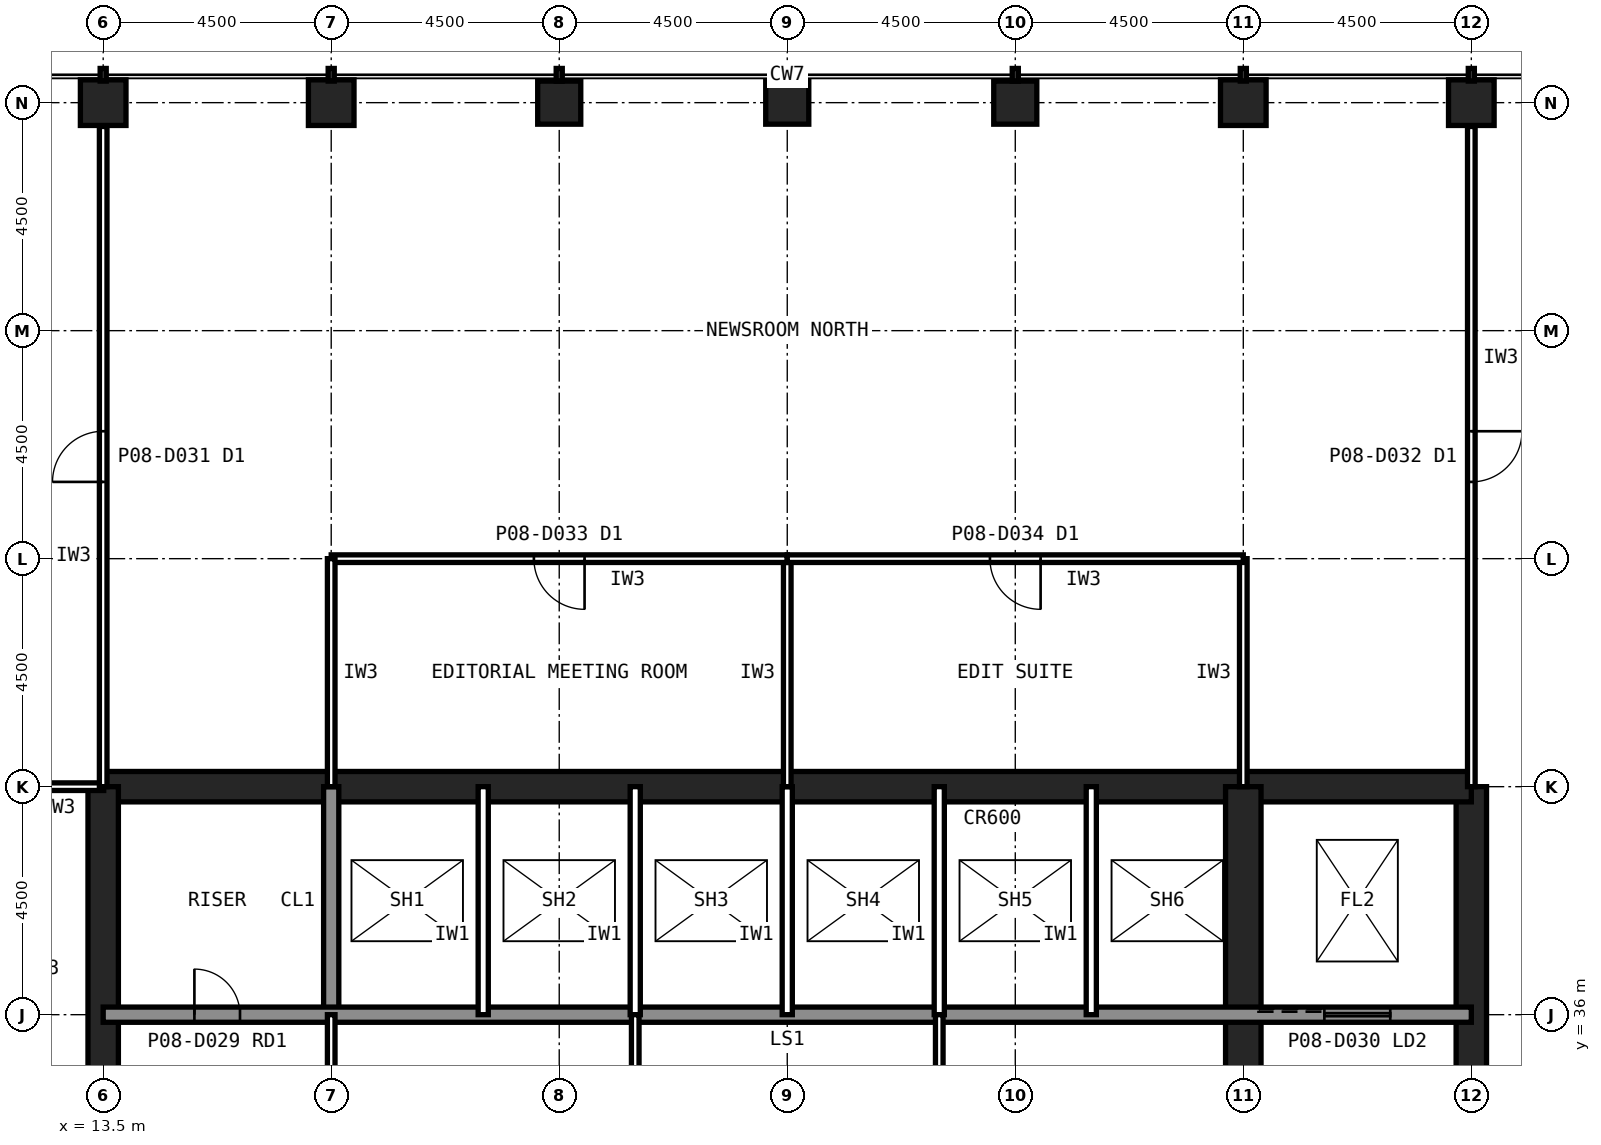
"""IFC4 building model, lengths in metres.
Left out: names, types, materials, properties, quantities, classifications, styles, units other than length and angle.
Written with IfcOpenShell. Run it as: python <this file> out.ifc"""

import sys

from ifc_helpers import new_model, si_unit, direction, frame, frame_2d, origin, origin_2d, place, context, subcontext, project, spatial, rectangle, hollow_rectangle, extrude, element, fill, save


model = new_model("IFC4")
c1 = context("Model", 3, precision=1e-05, world=origin(), true_north=direction((0.0, 1.0)))
c2 = subcontext(c1, "Body", "Model", "MODEL_VIEW")
j1 = project(units=[si_unit("LENGTHUNIT", "METRE"), si_unit("PLANEANGLEUNIT", "RADIAN")], contexts=[c1])
p1 = place(None, origin())
s1 = spatial("IfcSite", under=j1, at=p1, CompositionType="ELEMENT")
p2 = place(p1, origin())
s2 = spatial("IfcBuilding", under=s1, at=p2, CompositionType="ELEMENT")
p3 = place(p2, frame((0.0, 0.0, 37.4)))
s3 = spatial("IfcBuildingStorey", under=s2, at=p3, CompositionType="ELEMENT", Elevation=37.4)
for number, where, z_axis, x_axis in (
    (1, (40.5, 54.0, 0.0), (0.0, 0.0, 1.0), (1.0, 0.0, 0.0)),
    (2, (36.0, 54.0, 0.0), (0.0, 0.0, 1.0), (1.0, 0.0, 0.0)),
):
    element("IfcColumn", number, at=place(p3, frame(where, z_axis=z_axis, x_axis=x_axis)), inside=s3, PredefinedType="COLUMN", context=c2, shape_type="SweptSolid", body=[
        extrude(hollow_rectangle(XDim=0.9, YDim=0.9, WallThickness=0.063, at=origin_2d()), origin(), (0.0, 0.0, 1.0), 4.2),
    ])
for number, where, z_axis, x_axis in (
    (3, (31.5, 54.0, 0.0), (0.0, 0.0, 1.0), (1.0, 0.0, 0.0)),
    (4, (27.0, 54.0, 0.0), (0.0, 0.0, 1.0), (1.0, 0.0, 0.0)),
    (5, (22.5, 54.0, 0.0), (0.0, 0.0, 1.0), (1.0, 0.0, 0.0)),
):
    element("IfcColumn", number, at=place(p3, frame(where, z_axis=z_axis, x_axis=x_axis)), inside=s3, PredefinedType="COLUMN", context=c2, shape_type="SweptSolid", body=[
        extrude(hollow_rectangle(XDim=0.85, YDim=0.85, WallThickness=0.05, at=origin_2d()), origin(), (0.0, 0.0, 1.0), 4.2),
    ])
for number, where, z_axis, x_axis in (
    (6, (18.0, 54.0, 0.0), (0.0, 0.0, 1.0), (1.0, 0.0, 0.0)),
    (7, (13.5, 54.0, 0.0), (0.0, 0.0, 1.0), (1.0, 0.0, 0.0)),
):
    element("IfcColumn", number, at=place(p3, frame(where, z_axis=z_axis, x_axis=x_axis)), inside=s3, PredefinedType="COLUMN", context=c2, shape_type="SweptSolid", body=[
        extrude(hollow_rectangle(XDim=0.9, YDim=0.9, WallThickness=0.063, at=origin_2d()), origin(), (0.0, 0.0, 1.0), 4.2),
    ])
p4 = place(p3, frame((40.5, 13.5, 0.0), z_axis=(0.0, 0.0, 1.0), x_axis=(0.0, 1.0, 0.0)))
e8 = element("IfcWall", 8, at=p4, inside=s3, PredefinedType="SHEAR", context=c2, shape_type="SweptSolid", body=[
    extrude(rectangle(XDim=27.0, YDim=0.6, at=frame_2d((13.5, 0.0))), origin(), (0.0, 0.0, 1.0), 4.2),
])
p5 = place(p4, frame((5.85, 0.0, 0.0)))
e9 = element("IfcOpeningElement", 9, at=p5, cuts=e8, PredefinedType="OPENING", context=c2, shape_type="SweptSolid", body=[
    extrude(rectangle(XDim=1.8, YDim=2.1, at=frame_2d((0.9, 1.05))), frame((0.0, 0.31, 0.0), z_axis=(0.0, -1.0, 0.0), x_axis=(1.0, 0.0, 0.0)), (0.0, 0.0, 1.0), 0.62),
])
p6 = place(p4, frame((19.65, 0.0, 0.0)))
e10 = element("IfcOpeningElement", 10, at=p6, cuts=e8, PredefinedType="OPENING", context=c2, shape_type="SweptSolid", body=[
    extrude(rectangle(XDim=1.2, YDim=2.1, at=frame_2d((0.6, 1.05))), frame((0.0, 0.31, 0.0), z_axis=(0.0, -1.0, 0.0), x_axis=(1.0, 0.0, 0.0)), (0.0, 0.0, 1.0), 0.62),
])
p7 = place(p3, frame((40.5, 40.5, 0.0), z_axis=(0.0, 0.0, 1.0), x_axis=(-1.0, 0.0, 0.0)))
e11 = element("IfcWall", 11, at=p7, inside=s3, PredefinedType="SHEAR", context=c2, shape_type="SweptSolid", body=[
    extrude(rectangle(XDim=27.0, YDim=0.6, at=frame_2d((13.5, 0.0))), origin(), (0.0, 0.0, 1.0), 4.2),
])
p8 = place(p3, frame((13.5, 40.5, 0.0), z_axis=(0.0, 0.0, 1.0), x_axis=(0.0, -1.0, 0.0)))
e12 = element("IfcWall", 12, at=p8, inside=s3, PredefinedType="SHEAR", context=c2, shape_type="SweptSolid", body=[
    extrude(rectangle(XDim=27.0, YDim=0.6, at=frame_2d((13.5, 0.0))), origin(), (0.0, 0.0, 1.0), 4.2),
])
p9 = place(p8, frame((19.65, 0.0, 0.0)))
e13 = element("IfcOpeningElement", 13, at=p9, cuts=e12, PredefinedType="OPENING", context=c2, shape_type="SweptSolid", body=[
    extrude(rectangle(XDim=1.2, YDim=2.1, at=frame_2d((0.6, 1.05))), frame((0.0, 0.31, 0.0), z_axis=(0.0, -1.0, 0.0), x_axis=(1.0, 0.0, 0.0)), (0.0, 0.0, 1.0), 0.62),
])
p10 = place(p8, frame((5.85, 0.0, 0.0)))
e14 = element("IfcOpeningElement", 14, at=p10, cuts=e12, PredefinedType="OPENING", context=c2, shape_type="SweptSolid", body=[
    extrude(rectangle(XDim=1.8, YDim=2.1, at=frame_2d((0.9, 1.05))), frame((0.0, 0.31, 0.0), z_axis=(0.0, -1.0, 0.0), x_axis=(1.0, 0.0, 0.0)), (0.0, 0.0, 1.0), 0.62),
])
p11 = place(p3, frame((18.0, 36.0, 0.0), z_axis=(0.0, 0.0, 1.0), x_axis=(0.0, 1.0, 0.0)))
e15 = element("IfcWall", 15, at=p11, inside=s3, PredefinedType="SOLIDWALL", context=c2, shape_type="SweptSolid", body=[
    extrude(rectangle(XDim=4.5, YDim=0.3, at=frame_2d((2.25, 0.0))), origin(), (0.0, 0.0, 1.0), 4.04),
])
p12 = place(p3, frame((36.0, 22.5, 0.0), z_axis=(0.0, 0.0, 1.0), x_axis=(0.0, 1.0, 0.0)))
e16 = element("IfcWall", 16, at=p12, inside=s3, PredefinedType="SHEAR", context=c2, shape_type="SweptSolid", body=[
    extrude(rectangle(XDim=18.0, YDim=0.7, at=frame_2d((9.0, 0.0))), origin(), (0.0, 0.0, 1.0), 4.2),
])
p13 = place(p3, frame((13.5, 36.0, 0.0), z_axis=(0.0, 0.0, 1.0), x_axis=(1.0, 0.0, 0.0)))
e17 = element("IfcWall", 17, at=p13, inside=s3, PredefinedType="SOLIDWALL", context=c2, shape_type="SweptSolid", body=[
    extrude(rectangle(XDim=27.0, YDim=0.3, at=frame_2d((13.5, 0.0))), origin(), (0.0, 0.0, 1.0), 4.04),
])
p14 = place(p13, frame((1.8, 0.0, 0.0)))
e18 = element("IfcOpeningElement", 18, at=p14, cuts=e17, PredefinedType="OPENING", context=c2, shape_type="SweptSolid", body=[
    extrude(rectangle(XDim=0.9, YDim=2.1, at=frame_2d((0.45, 1.05))), frame((0.0, 0.16, 0.0), z_axis=(0.0, -1.0, 0.0), x_axis=(1.0, 0.0, 0.0)), (0.0, 0.0, 1.0), 0.32),
])
p15 = place(p13, frame((24.1, 0.0, 0.0)))
e19 = element("IfcOpeningElement", 19, at=p15, cuts=e17, PredefinedType="OPENING", context=c2, shape_type="SweptSolid", body=[
    extrude(rectangle(XDim=1.3, YDim=2.2, at=frame_2d((0.65, 1.1))), frame((0.0, 0.16, 0.0), z_axis=(0.0, -1.0, 0.0), x_axis=(1.0, 0.0, 0.0)), (0.0, 0.0, 1.0), 0.32),
])
for number, where, z_axis, x_axis in (
    (20, (21.0, 36.0, 0.0), (0.0, 0.0, 1.0), (0.0, 1.0, 0.0)),
    (21, (24.0, 36.0, 0.0), (0.0, 0.0, 1.0), (0.0, 1.0, 0.0)),
    (22, (27.0, 36.0, 0.0), (0.0, 0.0, 1.0), (0.0, 1.0, 0.0)),
    (23, (30.0, 36.0, 0.0), (0.0, 0.0, 1.0), (0.0, 1.0, 0.0)),
    (24, (33.0, 36.0, 0.0), (0.0, 0.0, 1.0), (0.0, 1.0, 0.0)),
):
    element("IfcWall", number, at=place(p3, frame(where, z_axis=z_axis, x_axis=x_axis)), inside=s3, PredefinedType="PARTITIONING", context=c2, shape_type="SweptSolid", body=[
        extrude(rectangle(XDim=4.5, YDim=0.2, at=frame_2d((2.25, 0.0))), origin(), (0.0, 0.0, 1.0), 4.04),
    ])
for number, where, z_axis, x_axis in (
    (25, (18.0, 33.3, 0.0), (0.0, 0.0, 1.0), (0.0, 1.0, 0.0)),
    (26, (24.0, 33.3, 0.0), (0.0, 0.0, 1.0), (0.0, 1.0, 0.0)),
    (27, (30.0, 33.3, 0.0), (0.0, 0.0, 1.0), (0.0, 1.0, 0.0)),
):
    element("IfcWall", number, at=place(p3, frame(where, z_axis=z_axis, x_axis=x_axis)), inside=s3, PredefinedType="PARTITIONING", context=c2, shape_type="SweptSolid", body=[
        extrude(rectangle(XDim=2.7, YDim=0.15, at=frame_2d((1.35, 0.0))), origin(), (0.0, 0.0, 1.0), 4.04),
    ])
p16 = place(p3, frame((13.51, 40.5, 0.0), z_axis=(0.0, 0.0, 1.0), x_axis=(-1.0, 0.0, 0.0)))
e28 = element("IfcWall", 28, at=p16, inside=s3, PredefinedType="PARTITIONING", context=c2, shape_type="SweptSolid", body=[
    extrude(rectangle(XDim=1.81, YDim=0.15, at=frame_2d((0.905, 0.0))), origin(), (0.0, 0.0, 1.0), 3.189),
])
p17 = place(p3, frame((27.0, 40.5, 0.0), z_axis=(0.0, 0.0, 1.0), x_axis=(0.0, 1.0, 0.0)))
e29 = element("IfcWall", 29, at=p17, inside=s3, PredefinedType="PARTITIONING", context=c2, shape_type="SweptSolid", body=[
    extrude(rectangle(XDim=4.5, YDim=0.15, at=frame_2d((2.25, 0.0))), origin(), (0.0, 0.0, 1.0), 3.189),
])
p18 = place(p3, frame((27.0, 45.0, 0.0), z_axis=(0.0, 0.0, 1.0), x_axis=(-1.0, 0.0, 0.0)))
e30 = element("IfcWall", 30, at=p18, inside=s3, PredefinedType="PARTITIONING", context=c2, shape_type="SweptSolid", body=[
    extrude(rectangle(XDim=9.0, YDim=0.15, at=frame_2d((4.5, 0.0))), origin(), (0.0, 0.0, 1.0), 4.04),
])
p19 = place(p18, frame((4.0, 0.0, 0.0)))
e31 = element("IfcOpeningElement", 31, at=p19, cuts=e30, PredefinedType="OPENING", context=c2, shape_type="SweptSolid", body=[
    extrude(rectangle(XDim=1.0, YDim=2.1, at=frame_2d((0.5, 1.05))), frame((0.0, 0.085, 0.0), z_axis=(0.0, -1.0, 0.0), x_axis=(1.0, 0.0, 0.0)), (0.0, 0.0, 1.0), 0.17),
])
for number, where, z_axis, x_axis in (
    (32, (18.0, 45.0, 0.0), (0.0, 0.0, 1.0), (0.0, -1.0, 0.0)),
    (33, (36.0, 40.5, 0.0), (0.0, 0.0, 1.0), (0.0, 1.0, 0.0)),
):
    element("IfcWall", number, at=place(p3, frame(where, z_axis=z_axis, x_axis=x_axis)), inside=s3, PredefinedType="PARTITIONING", context=c2, shape_type="SweptSolid", body=[
        extrude(rectangle(XDim=4.5, YDim=0.15, at=frame_2d((2.25, 0.0))), origin(), (0.0, 0.0, 1.0), 3.189),
    ])
p20 = place(p3, frame((36.0, 45.0, 0.0), z_axis=(0.0, 0.0, 1.0), x_axis=(-1.0, 0.0, 0.0)))
e34 = element("IfcWall", 34, at=p20, inside=s3, PredefinedType="PARTITIONING", context=c2, shape_type="SweptSolid", body=[
    extrude(rectangle(XDim=9.0, YDim=0.15, at=frame_2d((4.5, 0.0))), origin(), (0.0, 0.0, 1.0), 4.04),
])
p21 = place(p20, frame((4.0, 0.0, 0.0)))
e35 = element("IfcOpeningElement", 35, at=p21, cuts=e34, PredefinedType="OPENING", context=c2, shape_type="SweptSolid", body=[
    extrude(rectangle(XDim=1.0, YDim=2.1, at=frame_2d((0.5, 1.05))), frame((0.0, 0.085, 0.0), z_axis=(0.0, -1.0, 0.0), x_axis=(1.0, 0.0, 0.0)), (0.0, 0.0, 1.0), 0.17),
])
p22 = place(p3, frame((40.5, 53.53, 0.0), z_axis=(0.0, 0.0, 1.0), x_axis=(0.0, -1.0, 0.0)))
e36 = element("IfcWall", 36, at=p22, inside=s3, PredefinedType="PARTITIONING", context=c2, shape_type="SweptSolid", body=[
    extrude(rectangle(XDim=13.03, YDim=0.15, at=frame_2d((6.515, 0.0))), origin(), (0.0, 0.0, 1.0), 3.189),
])
p23 = place(p22, frame((6.015, 0.0, 0.0)))
e37 = element("IfcOpeningElement", 37, at=p23, cuts=e36, PredefinedType="OPENING", context=c2, shape_type="SweptSolid", body=[
    extrude(rectangle(XDim=1.0, YDim=2.1, at=frame_2d((0.5, 1.05))), frame((0.0, 0.085, 0.0), z_axis=(0.0, -1.0, 0.0), x_axis=(1.0, 0.0, 0.0)), (0.0, 0.0, 1.0), 0.17),
])
p24 = place(p3, frame((13.5, 40.5, 0.0), z_axis=(0.0, 0.0, 1.0), x_axis=(0.0, 1.0, 0.0)))
e38 = element("IfcWall", 38, at=p24, inside=s3, PredefinedType="PARTITIONING", context=c2, shape_type="SweptSolid", body=[
    extrude(rectangle(XDim=13.03, YDim=0.15, at=frame_2d((6.515, 0.0))), origin(), (0.0, 0.0, 1.0), 3.189),
])
p25 = place(p24, frame((6.015, 0.0, 0.0)))
e39 = element("IfcOpeningElement", 39, at=p25, cuts=e38, PredefinedType="OPENING", context=c2, shape_type="SweptSolid", body=[
    extrude(rectangle(XDim=1.0, YDim=2.1, at=frame_2d((0.5, 1.05))), frame((0.0, 0.085, 0.0), z_axis=(0.0, -1.0, 0.0), x_axis=(1.0, 0.0, 0.0)), (0.0, 0.0, 1.0), 0.17),
])
p26 = place(p14, origin())
e40 = element("IfcDoor", 40, at=p26, inside=s3, OperationType="SINGLE_SWING_LEFT", PredefinedType="DOOR", context=c2, shape_type="SweptSolid", body=[
    extrude(rectangle(XDim=0.9, YDim=2.1, at=frame_2d((0.45, 1.05))), frame((0.0, 0.025, 0.0), z_axis=(0.0, -1.0, 0.0), x_axis=(1.0, 0.0, 0.0)), (0.0, 0.0, 1.0), 0.05),
])
fill(e18, e40)
p27 = place(p15, origin())
e41 = element("IfcDoor", 41, at=p27, inside=s3, OperationType="SLIDING_TO_LEFT", PredefinedType="DOOR", context=c2, shape_type="SweptSolid", body=[
    extrude(rectangle(XDim=1.3, YDim=2.2, at=frame_2d((0.65, 1.1))), frame((0.0, 0.025, 0.0), z_axis=(0.0, -1.0, 0.0), x_axis=(1.0, 0.0, 0.0)), (0.0, 0.0, 1.0), 0.05),
])
fill(e19, e41)
p28 = place(p19, origin())
e42 = element("IfcDoor", 42, at=p28, inside=s3, OperationType="SINGLE_SWING_LEFT", PredefinedType="DOOR", context=c2, shape_type="SweptSolid", body=[
    extrude(rectangle(XDim=1.0, YDim=2.1, at=frame_2d((0.5, 1.05))), frame((0.0, 0.025, 0.0), z_axis=(0.0, -1.0, 0.0), x_axis=(1.0, 0.0, 0.0)), (0.0, 0.0, 1.0), 0.05),
])
fill(e31, e42)
p29 = place(p21, origin())
e43 = element("IfcDoor", 43, at=p29, inside=s3, OperationType="SINGLE_SWING_LEFT", PredefinedType="DOOR", context=c2, shape_type="SweptSolid", body=[
    extrude(rectangle(XDim=1.0, YDim=2.1, at=frame_2d((0.5, 1.05))), frame((0.0, 0.025, 0.0), z_axis=(0.0, -1.0, 0.0), x_axis=(1.0, 0.0, 0.0)), (0.0, 0.0, 1.0), 0.05),
])
fill(e35, e43)
p30 = place(p23, origin())
e44 = element("IfcDoor", 44, at=p30, inside=s3, OperationType="SINGLE_SWING_LEFT", PredefinedType="DOOR", context=c2, shape_type="SweptSolid", body=[
    extrude(rectangle(XDim=1.0, YDim=2.1, at=frame_2d((0.5, 1.05))), frame((0.0, 0.025, 0.0), z_axis=(0.0, -1.0, 0.0), x_axis=(1.0, 0.0, 0.0)), (0.0, 0.0, 1.0), 0.05),
])
fill(e37, e44)
p31 = place(p25, origin())
e45 = element("IfcDoor", 45, at=p31, inside=s3, OperationType="SINGLE_SWING_LEFT", PredefinedType="DOOR", context=c2, shape_type="SweptSolid", body=[
    extrude(rectangle(XDim=1.0, YDim=2.1, at=frame_2d((0.5, 1.05))), frame((0.0, 0.025, 0.0), z_axis=(0.0, -1.0, 0.0), x_axis=(1.0, 0.0, 0.0)), (0.0, 0.0, 1.0), 0.05),
])
fill(e39, e45)
save(model, sys.argv[1])
